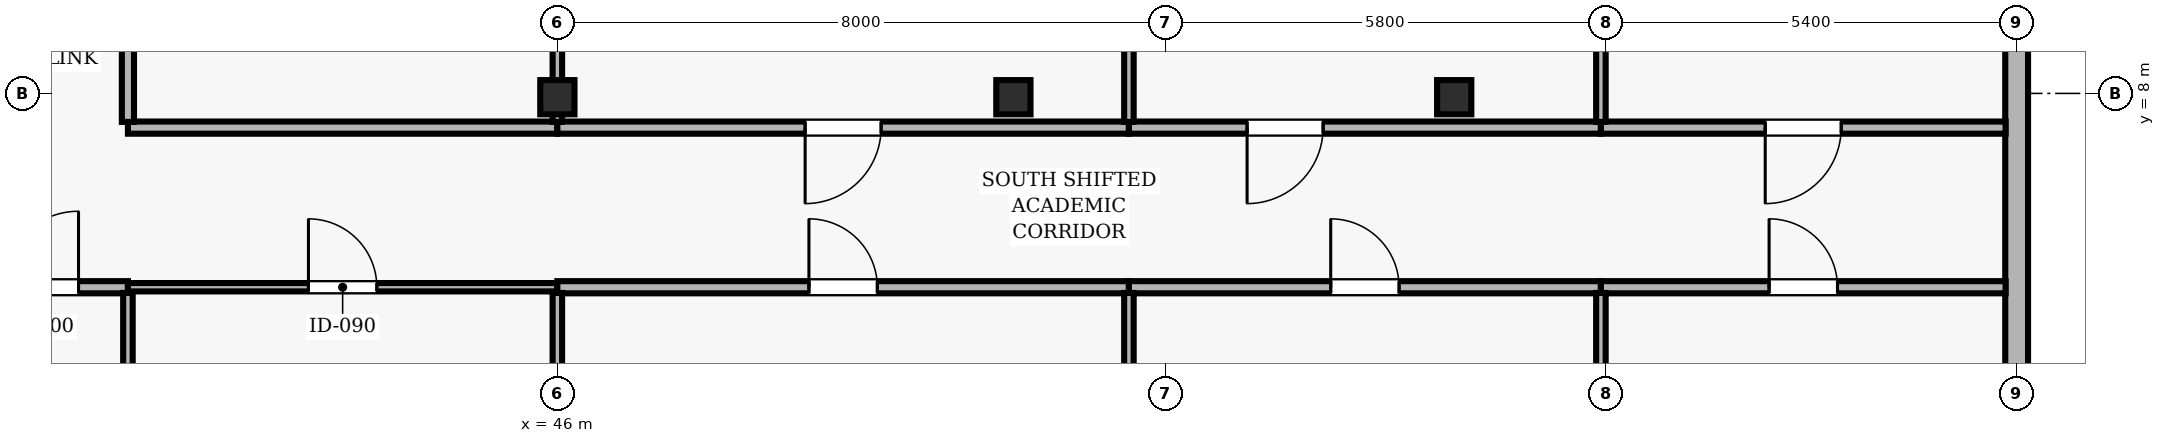
"""IFC4 building model, lengths in metres.
Left out: names, types, materials, properties, quantities, classifications, styles, units other than length and angle.
Written with IfcOpenShell. Run it as: python <this file> out.ifc"""

import sys

from ifc_helpers import new_model, si_unit, direction, frame, frame_2d, origin, origin_2d, place, context, subcontext, project, spatial, rectangle, hollow_rectangle, extrude, element, fill, save


model = new_model("IFC4")
c1 = context("Model", 3, precision=1e-05, world=origin(), true_north=direction((0.0, 1.0)))
c2 = subcontext(c1, "Body", "Model", "MODEL_VIEW")
j1 = project(units=[si_unit("LENGTHUNIT", "METRE"), si_unit("PLANEANGLEUNIT", "RADIAN")], contexts=[c1])
p1 = place(None, origin())
s1 = spatial("IfcSite", under=j1, at=p1, CompositionType="ELEMENT")
p2 = place(p1, origin())
s2 = spatial("IfcBuilding", under=s1, at=p2, CompositionType="ELEMENT")
p3 = place(p2, frame((0.0, 0.0, 230.4)))
s3 = spatial("IfcBuildingStorey", under=s2, at=p3, CompositionType="ELEMENT", Elevation=230.4)
for number, where, z_axis, x_axis in (
    (1, (46.0, 7.95, 0.0), (0.0, 0.0, 1.0), (1.0, 0.0, 0.0)),
    (2, (52.0, 7.95, 0.0), (0.0, 0.0, 1.0), (1.0, 0.0, 0.0)),
    (3, (57.8, 7.95, 0.0), (0.0, 0.0, 1.0), (1.0, 0.0, 0.0)),
):
    element("IfcColumn", number, at=place(p3, frame(where, z_axis=z_axis, x_axis=x_axis)), inside=s3, PredefinedType="COLUMN", context=c2, shape_type="SweptSolid", body=[
        extrude(hollow_rectangle(XDim=0.45, YDim=0.45, WallThickness=0.02, at=origin_2d()), origin(), (0.0, 0.0, 1.0), 3.9),
    ])
p4 = place(p3, frame((65.2, 2.5, 0.0), z_axis=(0.0, 0.0, 1.0), x_axis=(0.0, 1.0, 0.0)))
e4 = element("IfcWall", 4, at=p4, inside=s3, PredefinedType="SOLIDWALL", context=c2, shape_type="SweptSolid", body=[
    extrude(rectangle(XDim=11.0, YDim=0.3, at=frame_2d((5.5, 0.0))), origin(), (0.0, 0.0, 1.0), 3.69),
])
p5 = place(p4, frame((7.05, 0.0, 0.9)))
e5 = element("IfcOpeningElement", 5, at=p5, cuts=e4, PredefinedType="OPENING", context=c2, shape_type="SweptSolid", body=[
    extrude(rectangle(XDim=2.4, YDim=2.2, at=frame_2d((1.2, 1.1))), frame((0.0, 0.16, 0.0), z_axis=(0.0, -1.0, 0.0), x_axis=(1.0, 0.0, 0.0)), (0.0, 0.0, 1.0), 0.32),
])
p6 = place(p3, frame((38.05, 5.45, 0.0), z_axis=(0.0, 0.0, 1.0), x_axis=(1.0, 0.0, 0.0)))
e6 = element("IfcWall", 6, at=p6, inside=s3, PredefinedType="PARTITIONING", context=c2, shape_type="SweptSolid", body=[
    extrude(rectangle(XDim=2.3, YDim=0.16, at=frame_2d((1.15, 0.0))), origin(), (0.0, 0.0, 1.0), 3.343),
])
p7 = place(p6, frame((0.65, 0.0, 0.0)))
e7 = element("IfcOpeningElement", 7, at=p7, cuts=e6, PredefinedType="OPENING", context=c2, shape_type="SweptSolid", body=[
    extrude(rectangle(XDim=1.0, YDim=2.1, at=frame_2d((0.5, 1.05))), frame((0.0, 0.09, 0.0), z_axis=(0.0, -1.0, 0.0), x_axis=(1.0, 0.0, 0.0)), (0.0, 0.0, 1.0), 0.18),
])
p8 = place(p3, frame((40.35, 5.45, 0.0), z_axis=(0.0, 0.0, 1.0), x_axis=(1.0, 0.0, 0.0)))
e8 = element("IfcWall", 8, at=p8, inside=s3, PredefinedType="MOVABLE", context=c2, shape_type="SweptSolid", body=[
    extrude(rectangle(XDim=5.65, YDim=0.11, at=frame_2d((2.825, 0.0))), origin(), (0.0, 0.0, 1.0), 3.343),
])
p9 = place(p8, frame((2.375, 0.0, 0.0)))
e9 = element("IfcOpeningElement", 9, at=p9, cuts=e8, PredefinedType="OPENING", context=c2, shape_type="SweptSolid", body=[
    extrude(rectangle(XDim=0.9, YDim=2.1, at=frame_2d((0.45, 1.05))), frame((0.0, 0.065, 0.0), z_axis=(0.0, -1.0, 0.0), x_axis=(1.0, 0.0, 0.0)), (0.0, 0.0, 1.0), 0.13),
])
p10 = place(p3, frame((46.0, 5.45, 0.0), z_axis=(0.0, 0.0, 1.0), x_axis=(1.0, 0.0, 0.0)))
e10 = element("IfcWall", 10, at=p10, inside=s3, PredefinedType="PARTITIONING", context=c2, shape_type="SweptSolid", body=[
    extrude(rectangle(XDim=7.52, YDim=0.16, at=frame_2d((3.76, 0.0))), origin(), (0.0, 0.0, 1.0), 3.343),
])
p11 = place(p10, frame((3.31, 0.0, 0.0)))
e11 = element("IfcOpeningElement", 11, at=p11, cuts=e10, PredefinedType="OPENING", context=c2, shape_type="SweptSolid", body=[
    extrude(rectangle(XDim=0.9, YDim=2.1, at=frame_2d((0.45, 1.05))), frame((0.0, 0.09, 0.0), z_axis=(0.0, -1.0, 0.0), x_axis=(1.0, 0.0, 0.0)), (0.0, 0.0, 1.0), 0.18),
])
p12 = place(p3, frame((46.0, 7.55, 0.0), z_axis=(0.0, 0.0, 1.0), x_axis=(-1.0, 0.0, 0.0)))
e12 = element("IfcWall", 12, at=p12, inside=s3, PredefinedType="PARTITIONING", context=c2, shape_type="SweptSolid", body=[
    extrude(rectangle(XDim=5.65, YDim=0.16, at=frame_2d((2.825, 0.0))), origin(), (0.0, 0.0, 1.0), 3.139),
])
p13 = place(p3, frame((53.52, 5.45, 0.0), z_axis=(0.0, 0.0, 1.0), x_axis=(1.0, 0.0, 0.0)))
e13 = element("IfcWall", 13, at=p13, inside=s3, PredefinedType="PARTITIONING", context=c2, shape_type="SweptSolid", body=[
    extrude(rectangle(XDim=6.21, YDim=0.16, at=frame_2d((3.105, 0.0))), origin(), (0.0, 0.0, 1.0), 3.343),
])
p14 = place(p13, frame((2.655, 0.0, 0.0)))
e14 = element("IfcOpeningElement", 14, at=p14, cuts=e13, PredefinedType="OPENING", context=c2, shape_type="SweptSolid", body=[
    extrude(rectangle(XDim=0.9, YDim=2.1, at=frame_2d((0.45, 1.05))), frame((0.0, 0.09, 0.0), z_axis=(0.0, -1.0, 0.0), x_axis=(1.0, 0.0, 0.0)), (0.0, 0.0, 1.0), 0.18),
])
p15 = place(p3, frame((53.52, 7.55, 0.0), z_axis=(0.0, 0.0, 1.0), x_axis=(-1.0, 0.0, 0.0)))
e15 = element("IfcWall", 15, at=p15, inside=s3, PredefinedType="PARTITIONING", context=c2, shape_type="SweptSolid", body=[
    extrude(rectangle(XDim=7.52, YDim=0.16, at=frame_2d((3.76, 0.0))), origin(), (0.0, 0.0, 1.0), 3.139),
])
p16 = place(p15, frame((3.26, 0.0, 0.0)))
e16 = element("IfcOpeningElement", 16, at=p16, cuts=e15, PredefinedType="OPENING", context=c2, shape_type="SweptSolid", body=[
    extrude(rectangle(XDim=1.0, YDim=2.1, at=frame_2d((0.5, 1.05))), frame((0.0, 0.09, 0.0), z_axis=(0.0, -1.0, 0.0), x_axis=(1.0, 0.0, 0.0)), (0.0, 0.0, 1.0), 0.18),
])
p17 = place(p3, frame((59.73, 5.45, 0.0), z_axis=(0.0, 0.0, 1.0), x_axis=(1.0, 0.0, 0.0)))
e17 = element("IfcWall", 17, at=p17, inside=s3, PredefinedType="PARTITIONING", context=c2, shape_type="SweptSolid", body=[
    extrude(rectangle(XDim=5.325, YDim=0.16, at=frame_2d((2.663, 0.0))), origin(), (0.0, 0.0, 1.0), 3.69),
])
p18 = place(p17, frame((2.213, 0.0, 0.0)))
e18 = element("IfcOpeningElement", 18, at=p18, cuts=e17, PredefinedType="OPENING", context=c2, shape_type="SweptSolid", body=[
    extrude(rectangle(XDim=0.9, YDim=2.1, at=frame_2d((0.45, 1.05))), frame((0.0, 0.09, 0.0), z_axis=(0.0, -1.0, 0.0), x_axis=(1.0, 0.0, 0.0)), (0.0, 0.0, 1.0), 0.18),
])
p19 = place(p3, frame((59.73, 7.55, 0.0), z_axis=(0.0, 0.0, 1.0), x_axis=(-1.0, 0.0, 0.0)))
e19 = element("IfcWall", 19, at=p19, inside=s3, PredefinedType="PARTITIONING", context=c2, shape_type="SweptSolid", body=[
    extrude(rectangle(XDim=6.21, YDim=0.16, at=frame_2d((3.105, 0.0))), origin(), (0.0, 0.0, 1.0), 3.139),
])
p20 = place(p19, frame((3.655, 0.0, 0.0)))
e20 = element("IfcOpeningElement", 20, at=p20, cuts=e19, PredefinedType="OPENING", context=c2, shape_type="SweptSolid", body=[
    extrude(rectangle(XDim=1.0, YDim=2.1, at=frame_2d((0.5, 1.05))), frame((0.0, 0.09, 0.0), z_axis=(0.0, -1.0, 0.0), x_axis=(1.0, 0.0, 0.0)), (0.0, 0.0, 1.0), 0.18),
])
p21 = place(p3, frame((65.055, 7.55, 0.0), z_axis=(0.0, 0.0, 1.0), x_axis=(-1.0, 0.0, 0.0)))
e21 = element("IfcWall", 21, at=p21, inside=s3, PredefinedType="PARTITIONING", context=c2, shape_type="SweptSolid", body=[
    extrude(rectangle(XDim=5.325, YDim=0.16, at=frame_2d((2.663, 0.0))), origin(), (0.0, 0.0, 1.0), 3.69),
])
p22 = place(p21, frame((2.163, 0.0, 0.0)))
e22 = element("IfcOpeningElement", 22, at=p22, cuts=e21, PredefinedType="OPENING", context=c2, shape_type="SweptSolid", body=[
    extrude(rectangle(XDim=1.0, YDim=2.1, at=frame_2d((0.5, 1.05))), frame((0.0, 0.09, 0.0), z_axis=(0.0, -1.0, 0.0), x_axis=(1.0, 0.0, 0.0)), (0.0, 0.0, 1.0), 0.18),
])
p23 = place(p3, frame((40.35, 0.09, 0.0), z_axis=(0.0, 0.0, 1.0), x_axis=(0.0, 1.0, 0.0)))
e23 = element("IfcWall", 23, at=p23, inside=s3, PredefinedType="PARTITIONING", context=c2, shape_type="SweptSolid", body=[
    extrude(rectangle(XDim=5.285, YDim=0.125, at=frame_2d((2.643, 0.0))), origin(), (0.0, 0.0, 1.0), 3.69),
])
p24 = place(p3, frame((40.35, 7.625, 0.0), z_axis=(0.0, 0.0, 1.0), x_axis=(0.0, 1.0, 0.0)))
e24 = element("IfcWall", 24, at=p24, inside=s3, PredefinedType="PARTITIONING", context=c2, shape_type="SweptSolid", body=[
    extrude(rectangle(XDim=8.3, YDim=0.16, at=frame_2d((4.15, 0.0))), origin(), (0.0, 0.0, 1.0), 3.69),
])
p25 = place(p24, frame((3.65, 0.0, 0.0)))
e25 = element("IfcOpeningElement", 25, at=p25, cuts=e24, PredefinedType="OPENING", context=c2, shape_type="SweptSolid", body=[
    extrude(rectangle(XDim=1.0, YDim=2.1, at=frame_2d((0.5, 1.05))), frame((0.0, 0.09, 0.0), z_axis=(0.0, -1.0, 0.0), x_axis=(1.0, 0.0, 0.0)), (0.0, 0.0, 1.0), 0.18),
])
p26 = place(p3, frame((46.0, 0.145, 0.0), z_axis=(0.0, 0.0, 1.0), x_axis=(0.0, 1.0, 0.0)))
e26 = element("IfcWall", 26, at=p26, inside=s3, PredefinedType="PARTITIONING", context=c2, shape_type="SweptSolid", body=[
    extrude(rectangle(XDim=5.23, YDim=0.125, at=frame_2d((2.615, 0.0))), origin(), (0.0, 0.0, 1.0), 3.139),
])
p27 = place(p3, frame((46.0, 7.625, 0.0), z_axis=(0.0, 0.0, 1.0), x_axis=(0.0, 1.0, 0.0)))
e27 = element("IfcWall", 27, at=p27, inside=s3, PredefinedType="PARTITIONING", context=c2, shape_type="SweptSolid", body=[
    extrude(rectangle(XDim=8.23, YDim=0.125, at=frame_2d((4.115, 0.0))), origin(), (0.0, 0.0, 1.0), 3.139),
])
p28 = place(p3, frame((53.52, 0.09, 0.0), z_axis=(0.0, 0.0, 1.0), x_axis=(0.0, 1.0, 0.0)))
e28 = element("IfcWall", 28, at=p28, inside=s3, PredefinedType="PARTITIONING", context=c2, shape_type="SweptSolid", body=[
    extrude(rectangle(XDim=5.285, YDim=0.125, at=frame_2d((2.643, 0.0))), origin(), (0.0, 0.0, 1.0), 3.69),
])
p29 = place(p3, frame((53.52, 7.625, 0.0), z_axis=(0.0, 0.0, 1.0), x_axis=(0.0, 1.0, 0.0)))
e29 = element("IfcWall", 29, at=p29, inside=s3, PredefinedType="PARTITIONING", context=c2, shape_type="SweptSolid", body=[
    extrude(rectangle(XDim=8.23, YDim=0.125, at=frame_2d((4.115, 0.0))), origin(), (0.0, 0.0, 1.0), 3.69),
])
p30 = place(p3, frame((59.73, 0.09, 0.0), z_axis=(0.0, 0.0, 1.0), x_axis=(0.0, 1.0, 0.0)))
e30 = element("IfcWall", 30, at=p30, inside=s3, PredefinedType="PARTITIONING", context=c2, shape_type="SweptSolid", body=[
    extrude(rectangle(XDim=5.285, YDim=0.125, at=frame_2d((2.643, 0.0))), origin(), (0.0, 0.0, 1.0), 3.69),
])
p31 = place(p3, frame((59.73, 7.625, 0.0), z_axis=(0.0, 0.0, 1.0), x_axis=(0.0, 1.0, 0.0)))
e31 = element("IfcWall", 31, at=p31, inside=s3, PredefinedType="PARTITIONING", context=c2, shape_type="SweptSolid", body=[
    extrude(rectangle(XDim=8.23, YDim=0.125, at=frame_2d((4.115, 0.0))), origin(), (0.0, 0.0, 1.0), 3.69),
])
p32 = place(p7, origin())
e32 = element("IfcDoor", 32, at=p32, inside=s3, OperationType="SINGLE_SWING_RIGHT", PredefinedType="DOOR", context=c2, shape_type="SweptSolid", body=[
    extrude(rectangle(XDim=1.0, YDim=2.1, at=frame_2d((0.5, 1.05))), frame((0.0, 0.025, 0.0), z_axis=(0.0, -1.0, 0.0), x_axis=(1.0, 0.0, 0.0)), (0.0, 0.0, 1.0), 0.05),
])
fill(e7, e32)
p33 = place(p9, origin())
e33 = element("IfcDoor", 33, at=p33, inside=s3, OperationType="SINGLE_SWING_LEFT", PredefinedType="DOOR", context=c2, shape_type="SweptSolid", body=[
    extrude(rectangle(XDim=0.9, YDim=2.1, at=frame_2d((0.45, 1.05))), frame((0.0, 0.025, 0.0), z_axis=(0.0, -1.0, 0.0), x_axis=(1.0, 0.0, 0.0)), (0.0, 0.0, 1.0), 0.05),
])
fill(e9, e33)
p34 = place(p11, origin())
e34 = element("IfcDoor", 34, at=p34, inside=s3, OperationType="SINGLE_SWING_LEFT", PredefinedType="DOOR", context=c2, shape_type="SweptSolid", body=[
    extrude(rectangle(XDim=0.9, YDim=2.1, at=frame_2d((0.45, 1.05))), frame((0.0, 0.025, 0.0), z_axis=(0.0, -1.0, 0.0), x_axis=(1.0, 0.0, 0.0)), (0.0, 0.0, 1.0), 0.05),
])
fill(e11, e34)
p35 = place(p16, origin())
e35 = element("IfcDoor", 35, at=p35, inside=s3, OperationType="SINGLE_SWING_RIGHT", PredefinedType="DOOR", context=c2, shape_type="SweptSolid", body=[
    extrude(rectangle(XDim=1.0, YDim=2.1, at=frame_2d((0.5, 1.05))), frame((0.0, 0.025, 0.0), z_axis=(0.0, -1.0, 0.0), x_axis=(1.0, 0.0, 0.0)), (0.0, 0.0, 1.0), 0.05),
])
fill(e16, e35)
p36 = place(p14, origin())
e36 = element("IfcDoor", 36, at=p36, inside=s3, OperationType="SINGLE_SWING_LEFT", PredefinedType="DOOR", context=c2, shape_type="SweptSolid", body=[
    extrude(rectangle(XDim=0.9, YDim=2.1, at=frame_2d((0.45, 1.05))), frame((0.0, 0.025, 0.0), z_axis=(0.0, -1.0, 0.0), x_axis=(1.0, 0.0, 0.0)), (0.0, 0.0, 1.0), 0.05),
])
fill(e14, e36)
p37 = place(p20, origin())
e37 = element("IfcDoor", 37, at=p37, inside=s3, OperationType="SINGLE_SWING_RIGHT", PredefinedType="DOOR", context=c2, shape_type="SweptSolid", body=[
    extrude(rectangle(XDim=1.0, YDim=2.1, at=frame_2d((0.5, 1.05))), frame((0.0, 0.025, 0.0), z_axis=(0.0, -1.0, 0.0), x_axis=(1.0, 0.0, 0.0)), (0.0, 0.0, 1.0), 0.05),
])
fill(e20, e37)
p38 = place(p18, origin())
e38 = element("IfcDoor", 38, at=p38, inside=s3, OperationType="SINGLE_SWING_LEFT", PredefinedType="DOOR", context=c2, shape_type="SweptSolid", body=[
    extrude(rectangle(XDim=0.9, YDim=2.1, at=frame_2d((0.45, 1.05))), frame((0.0, 0.025, 0.0), z_axis=(0.0, -1.0, 0.0), x_axis=(1.0, 0.0, 0.0)), (0.0, 0.0, 1.0), 0.05),
])
fill(e18, e38)
p39 = place(p22, origin())
e39 = element("IfcDoor", 39, at=p39, inside=s3, OperationType="SINGLE_SWING_RIGHT", PredefinedType="DOOR", context=c2, shape_type="SweptSolid", body=[
    extrude(rectangle(XDim=1.0, YDim=2.1, at=frame_2d((0.5, 1.05))), frame((0.0, 0.025, 0.0), z_axis=(0.0, -1.0, 0.0), x_axis=(1.0, 0.0, 0.0)), (0.0, 0.0, 1.0), 0.05),
])
fill(e22, e39)
save(model, sys.argv[1])
